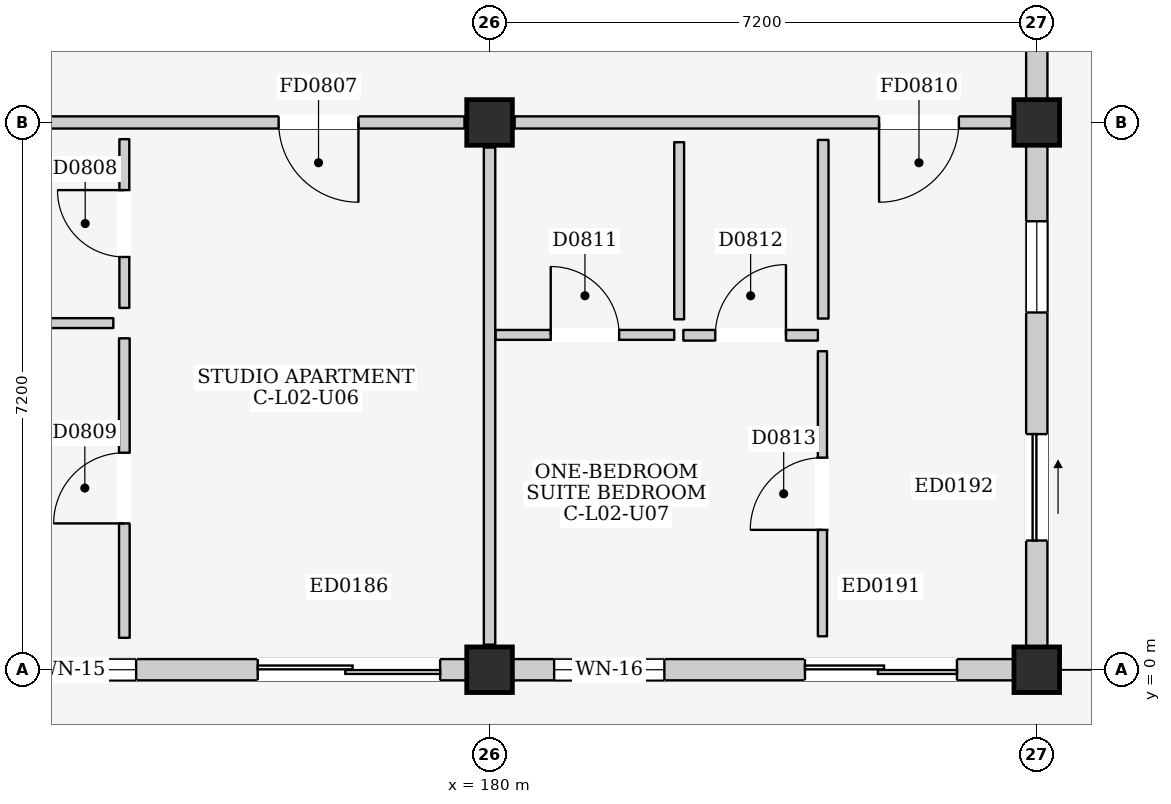
"""IFC4 building model, lengths in metres.
Left out: names, types, materials, properties, quantities, classifications, styles, units other than length and angle.
Written with IfcOpenShell. Run it as: python <this file> out.ifc"""

import sys

from ifc_helpers import new_model, si_unit, direction, frame, frame_2d, origin, origin_2d, place, context, subcontext, project, spatial, rectangle, extrude, element, fill, save


model = new_model("IFC4")
c1 = context("Model", 3, precision=1e-05, world=origin(), true_north=direction((0.0, 1.0)))
c2 = subcontext(c1, "Body", "Model", "MODEL_VIEW")
j1 = project(units=[si_unit("LENGTHUNIT", "METRE"), si_unit("PLANEANGLEUNIT", "RADIAN")], contexts=[c1])
p1 = place(None, origin())
s1 = spatial("IfcSite", under=j1, at=p1, CompositionType="ELEMENT")
p2 = place(p1, origin())
s2 = spatial("IfcBuilding", under=s1, at=p2, CompositionType="ELEMENT")
p3 = place(p2, frame((0.0, 0.0, 9.0)))
s3 = spatial("IfcBuildingStorey", under=s2, at=p3, CompositionType="ELEMENT", Elevation=9.0)
for number, where, z_axis, x_axis in (
    (1, (180.0, 0.0, 0.0), (0.0, 0.0, 1.0), (1.0, 0.0, 0.0)),
    (2, (180.0, 7.2, 0.0), (0.0, 0.0, 1.0), (1.0, 0.0, 0.0)),
    (3, (187.2, 0.0, 0.0), (0.0, 0.0, 1.0), (1.0, 0.0, 0.0)),
    (4, (187.2, 7.2, 0.0), (0.0, 0.0, 1.0), (1.0, 0.0, 0.0)),
):
    element("IfcColumn", number, at=place(p3, frame(where, z_axis=z_axis, x_axis=x_axis)), inside=s3, PredefinedType="COLUMN", context=c2, shape_type="SweptSolid", body=[
        extrude(rectangle(XDim=0.6, YDim=0.6, at=origin_2d()), origin(), (0.0, 0.0, 1.0), 3.2),
    ])
p4 = place(p3, frame((173.1, 0.0, 0.0), z_axis=(0.0, 0.0, 1.0), x_axis=(1.0, 0.0, 0.0)))
e5 = element("IfcWall", 5, at=p4, inside=s3, PredefinedType="ELEMENTEDWALL", context=c2, shape_type="SweptSolid", body=[
    extrude(rectangle(XDim=6.6, YDim=0.28, at=frame_2d((3.3, 0.0))), origin(), (0.0, 0.0, 1.0), 2.425),
])
p5 = place(p4, frame((3.85, 0.0, 0.0)))
e6 = element("IfcOpeningElement", 6, at=p5, cuts=e5, PredefinedType="OPENING", context=c2, shape_type="SweptSolid", body=[
    extrude(rectangle(XDim=2.4, YDim=2.12, at=frame_2d((1.2, 1.06))), frame((0.0, 0.155, 0.0), z_axis=(0.0, -1.0, 0.0), x_axis=(1.0, 0.0, 0.0)), (0.0, 0.0, 1.0), 0.31),
])
p6 = place(p4, frame((0.55, 0.0, 0.865)))
e7 = element("IfcOpeningElement", 7, at=p6, cuts=e5, PredefinedType="OPENING", context=c2, shape_type="SweptSolid", body=[
    extrude(rectangle(XDim=1.7, YDim=1.45, at=frame_2d((0.85, 0.725))), frame((0.0, 0.155, 0.0), z_axis=(0.0, -1.0, 0.0), x_axis=(1.0, 0.0, 0.0)), (0.0, 0.0, 1.0), 0.31),
])
p7 = place(p3, frame((180.3, 0.0, 0.0), z_axis=(0.0, 0.0, 1.0), x_axis=(1.0, 0.0, 0.0)))
e8 = element("IfcWall", 8, at=p7, inside=s3, PredefinedType="ELEMENTEDWALL", context=c2, shape_type="SweptSolid", body=[
    extrude(rectangle(XDim=6.6, YDim=0.28, at=frame_2d((3.3, 0.0))), origin(), (0.0, 0.0, 1.0), 2.425),
])
p8 = place(p7, frame((3.85, 0.0, 0.0)))
e9 = element("IfcOpeningElement", 9, at=p8, cuts=e8, PredefinedType="OPENING", context=c2, shape_type="SweptSolid", body=[
    extrude(rectangle(XDim=2.0, YDim=2.12, at=frame_2d((1.0, 1.06))), frame((0.0, 0.155, 0.0), z_axis=(0.0, -1.0, 0.0), x_axis=(1.0, 0.0, 0.0)), (0.0, 0.0, 1.0), 0.31),
])
p9 = place(p7, frame((0.55, 0.0, 0.9)))
e10 = element("IfcOpeningElement", 10, at=p9, cuts=e8, PredefinedType="OPENING", context=c2, shape_type="SweptSolid", body=[
    extrude(rectangle(XDim=1.45, YDim=1.4, at=frame_2d((0.725, 0.7))), frame((0.0, 0.155, 0.0), z_axis=(0.0, -1.0, 0.0), x_axis=(1.0, 0.0, 0.0)), (0.0, 0.0, 1.0), 0.31),
])
p10 = place(p3, frame((187.2, 0.3, 0.0), z_axis=(0.0, 0.0, 1.0), x_axis=(0.0, 1.0, 0.0)))
e11 = element("IfcWall", 11, at=p10, inside=s3, PredefinedType="ELEMENTEDWALL", context=c2, shape_type="SweptSolid", body=[
    extrude(rectangle(XDim=6.6, YDim=0.28, at=frame_2d((3.3, 0.0))), origin(), (0.0, 0.0, 1.0), 2.425),
])
p11 = place(p10, frame((1.4, 0.0, 0.0)))
e12 = element("IfcOpeningElement", 12, at=p11, cuts=e11, PredefinedType="OPENING", context=c2, shape_type="SweptSolid", body=[
    extrude(rectangle(XDim=1.4, YDim=2.1, at=frame_2d((0.7, 1.05))), frame((0.0, 0.155, 0.0), z_axis=(0.0, -1.0, 0.0), x_axis=(1.0, 0.0, 0.0)), (0.0, 0.0, 1.0), 0.31),
])
p12 = place(p10, frame((4.4, 0.0, 0.95)))
e13 = element("IfcOpeningElement", 13, at=p12, cuts=e11, PredefinedType="OPENING", context=c2, shape_type="SweptSolid", body=[
    extrude(rectangle(XDim=1.2, YDim=1.35, at=frame_2d((0.6, 0.675))), frame((0.0, 0.155, 0.0), z_axis=(0.0, -1.0, 0.0), x_axis=(1.0, 0.0, 0.0)), (0.0, 0.0, 1.0), 0.31),
])
p13 = place(p3, frame((187.2, 7.5, 0.0), z_axis=(0.0, 0.0, 1.0), x_axis=(0.0, 1.0, 0.0)))
e14 = element("IfcWall", 14, at=p13, inside=s3, PredefinedType="ELEMENTEDWALL", context=c2, shape_type="SweptSolid", body=[
    extrude(rectangle(XDim=6.6, YDim=0.28, at=frame_2d((3.3, 0.0))), origin(), (0.0, 0.0, 1.0), 2.425),
])
p14 = place(p13, frame((3.65, 0.0, 0.0)))
e15 = element("IfcOpeningElement", 15, at=p14, cuts=e14, PredefinedType="OPENING", context=c2, shape_type="SweptSolid", body=[
    extrude(rectangle(XDim=1.4, YDim=2.1, at=frame_2d((0.7, 1.05))), frame((0.0, 0.155, 0.0), z_axis=(0.0, -1.0, 0.0), x_axis=(1.0, 0.0, 0.0)), (0.0, 0.0, 1.0), 0.31),
])
p15 = place(p3, frame((173.13, 7.2, 0.0), z_axis=(0.0, 0.0, 1.0), x_axis=(1.0, 0.0, 0.0)))
e16 = element("IfcWall", 16, at=p15, inside=s3, PredefinedType="PARTITIONING", context=c2, shape_type="SweptSolid", body=[
    extrude(rectangle(XDim=6.54, YDim=0.16, at=frame_2d((3.27, 0.0))), origin(), (0.0, 0.0, 1.0), 2.345),
])
p16 = place(p15, frame((4.095, 0.0, 0.0)))
e17 = element("IfcOpeningElement", 17, at=p16, cuts=e16, PredefinedType="OPENING", context=c2, shape_type="SweptSolid", body=[
    extrude(rectangle(XDim=1.05, YDim=2.15, at=frame_2d((0.525, 1.075))), frame((0.0, 0.095, 0.0), z_axis=(0.0, -1.0, 0.0), x_axis=(1.0, 0.0, 0.0)), (0.0, 0.0, 1.0), 0.19),
])
p17 = place(p3, frame((180.0, 0.33, 0.0), z_axis=(0.0, 0.0, 1.0), x_axis=(0.0, 1.0, 0.0)))
e18 = element("IfcWall", 18, at=p17, inside=s3, PredefinedType="PARTITIONING", context=c2, shape_type="SweptSolid", body=[
    extrude(rectangle(XDim=6.54, YDim=0.15, at=frame_2d((3.27, 0.0))), origin(), (0.0, 0.0, 1.0), 2.395),
])
p18 = place(p3, frame((173.0, 4.56, 0.0), z_axis=(0.0, 0.0, 1.0), x_axis=(1.0, 0.0, 0.0)))
e19 = element("IfcWall", 19, at=p18, inside=s3, PredefinedType="PARTITIONING", context=c2, shape_type="SweptSolid", body=[
    extrude(rectangle(XDim=2.05, YDim=0.13, at=frame_2d((1.025, 0.0))), origin(), (0.0, 0.0, 1.0), 2.96),
])
p19 = place(p3, frame((175.195, 4.76, 0.0), z_axis=(0.0, 0.0, 1.0), x_axis=(0.0, 1.0, 0.0)))
e20 = element("IfcWall", 20, at=p19, inside=s3, PredefinedType="PARTITIONING", context=c2, shape_type="SweptSolid", body=[
    extrude(rectangle(XDim=2.22, YDim=0.13, at=frame_2d((1.11, 0.0))), origin(), (0.0, 0.0, 1.0), 2.96),
])
p20 = place(p19, frame((0.67, 0.0, 0.0)))
e21 = element("IfcOpeningElement", 21, at=p20, cuts=e20, PredefinedType="OPENING", context=c2, shape_type="SweptSolid", body=[
    extrude(rectangle(XDim=0.88, YDim=2.1, at=frame_2d((0.44, 1.05))), frame((0.0, 0.08, 0.0), z_axis=(0.0, -1.0, 0.0), x_axis=(1.0, 0.0, 0.0)), (0.0, 0.0, 1.0), 0.16),
])
p21 = place(p3, frame((175.195, 0.42, 0.0), z_axis=(0.0, 0.0, 1.0), x_axis=(0.0, 1.0, 0.0)))
e22 = element("IfcWall", 22, at=p21, inside=s3, PredefinedType="PARTITIONING", context=c2, shape_type="SweptSolid", body=[
    extrude(rectangle(XDim=3.94, YDim=0.14, at=frame_2d((1.97, 0.0))), origin(), (0.0, 0.0, 1.0), 2.96),
])
p22 = place(p21, frame((1.505, 0.0, 0.0)))
e23 = element("IfcOpeningElement", 23, at=p22, cuts=e22, PredefinedType="OPENING", context=c2, shape_type="SweptSolid", body=[
    extrude(rectangle(XDim=0.93, YDim=2.14, at=frame_2d((0.465, 1.07))), frame((0.0, 0.085, 0.0), z_axis=(0.0, -1.0, 0.0), x_axis=(1.0, 0.0, 0.0)), (0.0, 0.0, 1.0), 0.17),
])
p23 = place(p3, frame((180.33, 7.2, 0.0), z_axis=(0.0, 0.0, 1.0), x_axis=(1.0, 0.0, 0.0)))
e24 = element("IfcWall", 24, at=p23, inside=s3, PredefinedType="PARTITIONING", context=c2, shape_type="SweptSolid", body=[
    extrude(rectangle(XDim=6.54, YDim=0.16, at=frame_2d((3.27, 0.0))), origin(), (0.0, 0.0, 1.0), 2.345),
])
p24 = place(p23, frame((4.795, 0.0, 0.0)))
e25 = element("IfcOpeningElement", 25, at=p24, cuts=e24, PredefinedType="OPENING", context=c2, shape_type="SweptSolid", body=[
    extrude(rectangle(XDim=1.05, YDim=2.15, at=frame_2d((0.525, 1.075))), frame((0.0, 0.095, 0.0), z_axis=(0.0, -1.0, 0.0), x_axis=(1.0, 0.0, 0.0)), (0.0, 0.0, 1.0), 0.19),
])
p25 = place(p3, frame((180.08, 4.405, 0.0), z_axis=(0.0, 0.0, 1.0), x_axis=(1.0, 0.0, 0.0)))
e26 = element("IfcWall", 26, at=p25, inside=s3, PredefinedType="PARTITIONING", context=c2, shape_type="SweptSolid", body=[
    extrude(rectangle(XDim=2.35, YDim=0.13, at=frame_2d((1.175, 0.0))), origin(), (0.0, 0.0, 1.0), 2.96),
])
p26 = place(p25, frame((0.725, 0.0, 0.0)))
e27 = element("IfcOpeningElement", 27, at=p26, cuts=e26, PredefinedType="OPENING", context=c2, shape_type="SweptSolid", body=[
    extrude(rectangle(XDim=0.9, YDim=2.1, at=frame_2d((0.45, 1.05))), frame((0.0, 0.08, 0.0), z_axis=(0.0, -1.0, 0.0), x_axis=(1.0, 0.0, 0.0)), (0.0, 0.0, 1.0), 0.16),
])
p27 = place(p3, frame((182.495, 4.61, 0.0), z_axis=(0.0, 0.0, 1.0), x_axis=(0.0, 1.0, 0.0)))
e28 = element("IfcWall", 28, at=p27, inside=s3, PredefinedType="PARTITIONING", context=c2, shape_type="SweptSolid", body=[
    extrude(rectangle(XDim=2.33, YDim=0.13, at=frame_2d((1.165, 0.0))), origin(), (0.0, 0.0, 1.0), 2.96),
])
p28 = place(p3, frame((182.55, 4.4, 0.0), z_axis=(0.0, 0.0, 1.0), x_axis=(1.0, 0.0, 0.0)))
e29 = element("IfcWall", 29, at=p28, inside=s3, PredefinedType="PARTITIONING", context=c2, shape_type="SweptSolid", body=[
    extrude(rectangle(XDim=1.77, YDim=0.14, at=frame_2d((0.885, 0.0))), origin(), (0.0, 0.0, 1.0), 2.96),
])
p29 = place(p28, frame((0.42, 0.0, 0.0)))
e30 = element("IfcOpeningElement", 30, at=p29, cuts=e29, PredefinedType="OPENING", context=c2, shape_type="SweptSolid", body=[
    extrude(rectangle(XDim=0.93, YDim=2.14, at=frame_2d((0.465, 1.07))), frame((0.0, 0.085, 0.0), z_axis=(0.0, -1.0, 0.0), x_axis=(1.0, 0.0, 0.0)), (0.0, 0.0, 1.0), 0.17),
])
p30 = place(p3, frame((184.39, 4.62, 0.0), z_axis=(0.0, 0.0, 1.0), x_axis=(0.0, 1.0, 0.0)))
e31 = element("IfcWall", 31, at=p30, inside=s3, PredefinedType="PARTITIONING", context=c2, shape_type="SweptSolid", body=[
    extrude(rectangle(XDim=2.35, YDim=0.14, at=frame_2d((1.175, 0.0))), origin(), (0.0, 0.0, 1.0), 2.96),
])
p31 = place(p3, frame((184.38, 0.44, 0.0), z_axis=(0.0, 0.0, 1.0), x_axis=(0.0, 1.0, 0.0)))
e32 = element("IfcWall", 32, at=p31, inside=s3, PredefinedType="PARTITIONING", context=c2, shape_type="SweptSolid", body=[
    extrude(rectangle(XDim=3.75, YDim=0.12, at=frame_2d((1.875, 0.0))), origin(), (0.0, 0.0, 1.0), 2.96),
])
p32 = place(p31, frame((1.4, 0.0, 0.0)))
e33 = element("IfcOpeningElement", 33, at=p32, cuts=e32, PredefinedType="OPENING", context=c2, shape_type="SweptSolid", body=[
    extrude(rectangle(XDim=0.95, YDim=2.15, at=frame_2d((0.475, 1.075))), frame((0.0, 0.075, 0.0), z_axis=(0.0, -1.0, 0.0), x_axis=(1.0, 0.0, 0.0)), (0.0, 0.0, 1.0), 0.15),
])
p33 = place(p5, frame((2.4, 0.0, 0.0), z_axis=(0.0, 0.0, 1.0), x_axis=(-1.0, 0.0, 0.0)))
e34 = element("IfcDoor", 34, at=p33, inside=s3, OperationType="DOUBLE_DOOR_SLIDING", PredefinedType="DOOR", context=c2, shape_type="SweptSolid", body=[
    extrude(rectangle(XDim=2.4, YDim=2.12, at=frame_2d((1.2, 1.06))), frame((0.0, 0.025, 0.0), z_axis=(0.0, -1.0, 0.0), x_axis=(1.0, 0.0, 0.0)), (0.0, 0.0, 1.0), 0.05),
])
fill(e6, e34)
p34 = place(p6, origin())
e35 = element("IfcWindow", 35, at=p34, inside=s3, PartitioningType="DOUBLE_PANEL_VERTICAL", PredefinedType="WINDOW", context=c2, shape_type="SweptSolid", body=[
    extrude(rectangle(XDim=1.7, YDim=1.45, at=frame_2d((0.85, 0.725))), frame((0.0, 0.03, 0.0), z_axis=(0.0, -1.0, 0.0), x_axis=(1.0, 0.0, 0.0)), (0.0, 0.0, 1.0), 0.06),
])
fill(e7, e35)
p35 = place(p8, frame((2.0, 0.0, 0.0), z_axis=(0.0, 0.0, 1.0), x_axis=(-1.0, 0.0, 0.0)))
e36 = element("IfcDoor", 36, at=p35, inside=s3, OperationType="DOUBLE_DOOR_SLIDING", PredefinedType="DOOR", context=c2, shape_type="SweptSolid", body=[
    extrude(rectangle(XDim=2.0, YDim=2.12, at=frame_2d((1.0, 1.06))), frame((0.0, 0.025, 0.0), z_axis=(0.0, -1.0, 0.0), x_axis=(1.0, 0.0, 0.0)), (0.0, 0.0, 1.0), 0.05),
])
fill(e9, e36)
p36 = place(p9, origin())
e37 = element("IfcWindow", 37, at=p36, inside=s3, PartitioningType="DOUBLE_PANEL_VERTICAL", PredefinedType="WINDOW", context=c2, shape_type="SweptSolid", body=[
    extrude(rectangle(XDim=1.45, YDim=1.4, at=frame_2d((0.725, 0.7))), frame((0.0, 0.03, 0.0), z_axis=(0.0, -1.0, 0.0), x_axis=(1.0, 0.0, 0.0)), (0.0, 0.0, 1.0), 0.06),
])
fill(e10, e37)
p37 = place(p11, frame((1.4, 0.0, 0.0), z_axis=(0.0, 0.0, 1.0), x_axis=(-1.0, 0.0, 0.0)))
e38 = element("IfcDoor", 38, at=p37, inside=s3, OperationType="SLIDING_TO_RIGHT", PredefinedType="DOOR", context=c2, shape_type="SweptSolid", body=[
    extrude(rectangle(XDim=1.4, YDim=2.1, at=frame_2d((0.7, 1.05))), frame((0.0, 0.025, 0.0), z_axis=(0.0, -1.0, 0.0), x_axis=(1.0, 0.0, 0.0)), (0.0, 0.0, 1.0), 0.05),
])
fill(e12, e38)
p38 = place(p12, origin())
e39 = element("IfcWindow", 39, at=p38, inside=s3, PartitioningType="SINGLE_PANEL", PredefinedType="WINDOW", context=c2, shape_type="SweptSolid", body=[
    extrude(rectangle(XDim=1.2, YDim=1.35, at=frame_2d((0.6, 0.675))), frame((0.0, 0.03, 0.0), z_axis=(0.0, -1.0, 0.0), x_axis=(1.0, 0.0, 0.0)), (0.0, 0.0, 1.0), 0.06),
])
fill(e13, e39)
p39 = place(p16, frame((1.05, 0.0, 0.0), z_axis=(0.0, 0.0, 1.0), x_axis=(-1.0, 0.0, 0.0)))
e40 = element("IfcDoor", 40, at=p39, inside=s3, OperationType="SINGLE_SWING_LEFT", PredefinedType="DOOR", context=c2, shape_type="SweptSolid", body=[
    extrude(rectangle(XDim=1.05, YDim=2.15, at=frame_2d((0.525, 1.075))), frame((0.0, 0.025, 0.0), z_axis=(0.0, -1.0, 0.0), x_axis=(1.0, 0.0, 0.0)), (0.0, 0.0, 1.0), 0.05),
])
fill(e17, e40)
p40 = place(p20, origin())
e41 = element("IfcDoor", 41, at=p40, inside=s3, OperationType="SINGLE_SWING_RIGHT", PredefinedType="DOOR", context=c2, shape_type="SweptSolid", body=[
    extrude(rectangle(XDim=0.88, YDim=2.1, at=frame_2d((0.44, 1.05))), frame((0.0, 0.025, 0.0), z_axis=(0.0, -1.0, 0.0), x_axis=(1.0, 0.0, 0.0)), (0.0, 0.0, 1.0), 0.05),
])
fill(e21, e41)
p41 = place(p22, origin())
e42 = element("IfcDoor", 42, at=p41, inside=s3, OperationType="SINGLE_SWING_LEFT", PredefinedType="DOOR", context=c2, shape_type="SweptSolid", body=[
    extrude(rectangle(XDim=0.93, YDim=2.14, at=frame_2d((0.465, 1.07))), frame((0.0, 0.025, 0.0), z_axis=(0.0, -1.0, 0.0), x_axis=(1.0, 0.0, 0.0)), (0.0, 0.0, 1.0), 0.05),
])
fill(e23, e42)
p42 = place(p24, frame((1.05, 0.0, 0.0), z_axis=(0.0, 0.0, 1.0), x_axis=(-1.0, 0.0, 0.0)))
e43 = element("IfcDoor", 43, at=p42, inside=s3, OperationType="SINGLE_SWING_RIGHT", PredefinedType="DOOR", context=c2, shape_type="SweptSolid", body=[
    extrude(rectangle(XDim=1.05, YDim=2.15, at=frame_2d((0.525, 1.075))), frame((0.0, 0.025, 0.0), z_axis=(0.0, -1.0, 0.0), x_axis=(1.0, 0.0, 0.0)), (0.0, 0.0, 1.0), 0.05),
])
fill(e25, e43)
p43 = place(p26, origin())
e44 = element("IfcDoor", 44, at=p43, inside=s3, OperationType="SINGLE_SWING_LEFT", PredefinedType="DOOR", context=c2, shape_type="SweptSolid", body=[
    extrude(rectangle(XDim=0.9, YDim=2.1, at=frame_2d((0.45, 1.05))), frame((0.0, 0.025, 0.0), z_axis=(0.0, -1.0, 0.0), x_axis=(1.0, 0.0, 0.0)), (0.0, 0.0, 1.0), 0.05),
])
fill(e27, e44)
p44 = place(p29, origin())
e45 = element("IfcDoor", 45, at=p44, inside=s3, OperationType="SINGLE_SWING_RIGHT", PredefinedType="DOOR", context=c2, shape_type="SweptSolid", body=[
    extrude(rectangle(XDim=0.93, YDim=2.14, at=frame_2d((0.465, 1.07))), frame((0.0, 0.025, 0.0), z_axis=(0.0, -1.0, 0.0), x_axis=(1.0, 0.0, 0.0)), (0.0, 0.0, 1.0), 0.05),
])
fill(e30, e45)
p45 = place(p32, origin())
e46 = element("IfcDoor", 46, at=p45, inside=s3, OperationType="SINGLE_SWING_LEFT", PredefinedType="DOOR", context=c2, shape_type="SweptSolid", body=[
    extrude(rectangle(XDim=0.95, YDim=2.15, at=frame_2d((0.475, 1.075))), frame((0.0, 0.025, 0.0), z_axis=(0.0, -1.0, 0.0), x_axis=(1.0, 0.0, 0.0)), (0.0, 0.0, 1.0), 0.05),
])
fill(e33, e46)
save(model, sys.argv[1])
